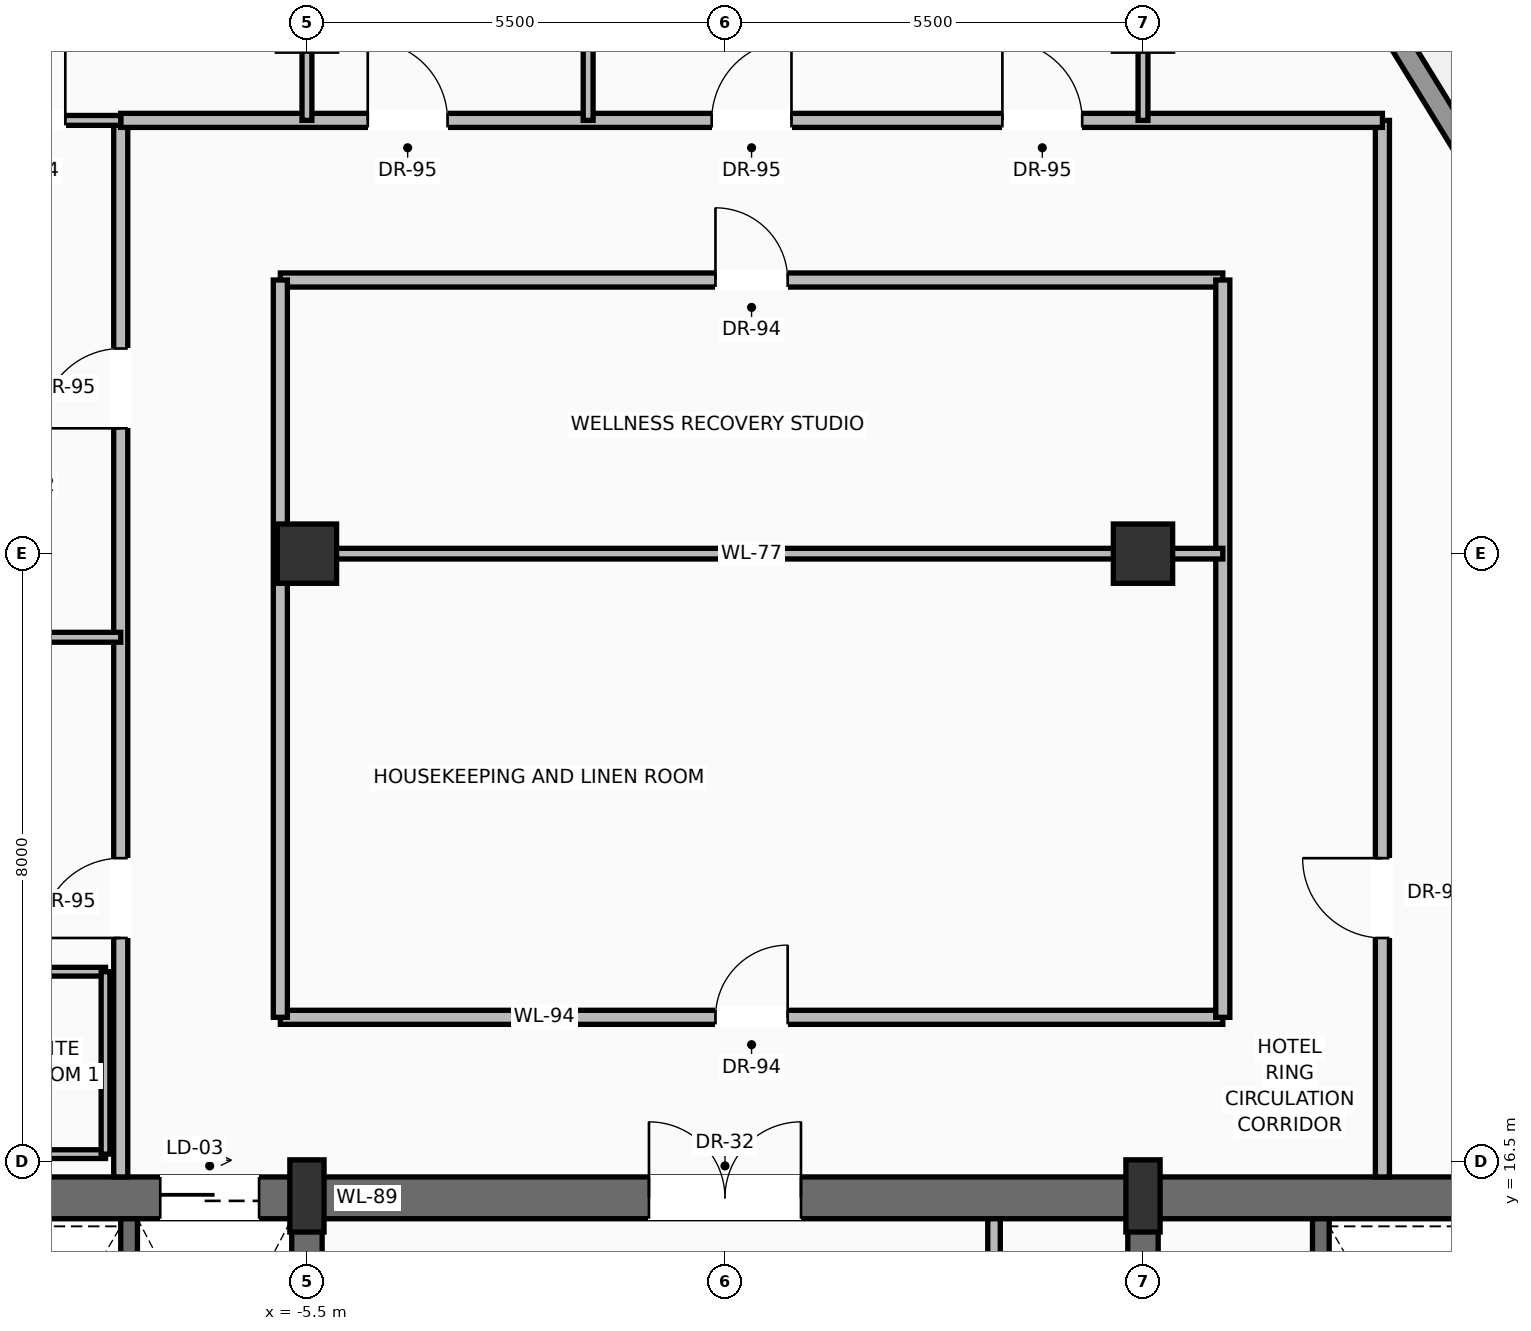
"""IFC4 building model, lengths in metres.
Left out: names, types, materials, properties, quantities, classifications, styles, units other than length and angle.
Written with IfcOpenShell. Run it as: python <this file> out.ifc"""

import sys

from ifc_helpers import new_model, si_unit, direction, frame, frame_2d, origin, origin_2d, place, context, subcontext, project, spatial, rectangle, extrude, source, transform, mapped, element, fill, save


model = new_model("IFC4")
c1 = context("Model", 3, precision=1e-05, world=origin(), true_north=direction((0.0, 1.0)))
c2 = subcontext(c1, "Body", "Model", "MODEL_VIEW")
j1 = project(units=[si_unit("LENGTHUNIT", "METRE"), si_unit("PLANEANGLEUNIT", "RADIAN")], contexts=[c1])
p1 = place(None, origin())
s1 = spatial("IfcSite", under=j1, at=p1, CompositionType="ELEMENT")
p2 = place(p1, origin())
s2 = spatial("IfcBuilding", under=s1, at=p2, CompositionType="ELEMENT")
p3 = place(p2, frame((0.0, 0.0, 244.15)))
s3 = spatial("IfcBuildingStorey", under=s2, at=p3, CompositionType="ELEMENT", Elevation=244.15)
p4 = place(p3, frame((-10.7, 16.025, 0.0), z_axis=(0.0, 0.0, 1.0), x_axis=(1.0, 0.0, 0.0)))
e1 = element("IfcWall", 1, at=p4, inside=s3, PredefinedType="SHEAR", context=c2, shape_type="SweptSolid", body=[
    extrude(rectangle(XDim=21.4, YDim=0.55, at=frame_2d((10.7, 0.0))), origin(), (0.0, 0.0, 1.0), 3.24),
])
p5 = place(p4, frame((3.27, 0.0, 0.0)))
e2 = element("IfcOpeningElement", 2, at=p5, cuts=e1, PredefinedType="OPENING", context=c2, shape_type="SweptSolid", body=[
    extrude(rectangle(XDim=1.3, YDim=2.3, at=frame_2d((0.65, 1.15))), frame((0.0, 0.285, 0.0), z_axis=(0.0, -1.0, 0.0), x_axis=(1.0, 0.0, 0.0)), (0.0, 0.0, 1.0), 0.57),
])
p6 = place(p4, frame((9.7, 0.0, 0.0)))
e3 = element("IfcOpeningElement", 3, at=p6, cuts=e1, PredefinedType="OPENING", context=c2, shape_type="SweptSolid", body=[
    extrude(rectangle(XDim=2.0, YDim=2.4, at=frame_2d((1.0, 1.2))), frame((0.0, 0.285, 0.0), z_axis=(0.0, -1.0, 0.0), x_axis=(1.0, 0.0, 0.0)), (0.0, 0.0, 1.0), 0.57),
])
p7 = place(p3, frame((-5.5, 0.575, 0.0), z_axis=(0.0, 0.0, 1.0), x_axis=(0.0, 1.0, 0.0)))
e4 = element("IfcWall", 4, at=p7, inside=s3, PredefinedType="SHEAR", context=c2, shape_type="SweptSolid", body=[
    extrude(rectangle(XDim=15.45, YDim=0.4, at=frame_2d((7.725, 0.0))), origin(), (0.0, 0.0, 1.0), 3.24),
])
p8 = place(p7, frame((8.925, 0.0, 0.0)))
e5 = element("IfcOpeningElement", 5, at=p8, cuts=e4, PredefinedType="OPENING", context=c2, shape_type="SweptSolid", body=[
    extrude(rectangle(XDim=1.1, YDim=2.2, at=frame_2d((0.55, 1.1))), frame((0.0, 0.21, 0.0), z_axis=(0.0, -1.0, 0.0), x_axis=(1.0, 0.0, 0.0)), (0.0, 0.0, 1.0), 0.42),
])
p9 = place(p3, frame((5.5, 0.575, 0.0), z_axis=(0.0, 0.0, 1.0), x_axis=(0.0, 1.0, 0.0)))
e6 = element("IfcWall", 6, at=p9, inside=s3, PredefinedType="SHEAR", context=c2, shape_type="SweptSolid", body=[
    extrude(rectangle(XDim=15.45, YDim=0.4, at=frame_2d((7.725, 0.0))), origin(), (0.0, 0.0, 1.0), 3.24),
])
p10 = place(p9, frame((8.925, 0.0, 0.0)))
e7 = element("IfcOpeningElement", 7, at=p10, cuts=e6, PredefinedType="OPENING", context=c2, shape_type="SweptSolid", body=[
    extrude(rectangle(XDim=1.1, YDim=2.2, at=frame_2d((0.55, 1.1))), frame((0.0, 0.21, 0.0), z_axis=(0.0, -1.0, 0.0), x_axis=(1.0, 0.0, 0.0)), (0.0, 0.0, 1.0), 0.42),
])
m1 = source(origin(), c2, "Body", "SweptSolid", [
    extrude(rectangle(XDim=0.45, YDim=0.95, at=origin_2d()), origin(), (0.0, 0.0, 1.0), 3.45),
])
for number, where, z_axis, x_axis in (
    (8, (-5.5, 16.05, 0.0), (0.0, 0.0, 1.0), (1.0, 0.0, 0.0)),
    (9, (5.5, 16.05, 0.0), (0.0, 0.0, 1.0), (1.0, 0.0, 0.0)),
):
    element("IfcColumn", number, at=place(p3, frame(where, z_axis=z_axis, x_axis=x_axis)), inside=s3, PredefinedType="PILASTER", context=c2, shape_type="MappedRepresentation", body=[
        mapped(m1, transform((0.0, 0.0, 0.0), scale=1.0)),
    ])
m2 = source(origin(), c2, "Body", "SweptSolid", [
    extrude(rectangle(XDim=0.78, YDim=0.78, at=origin_2d()), origin(), (0.0, 0.0, 1.0), 3.45),
])
for number, where, z_axis, x_axis in (
    (10, (-5.5, 24.5, 0.0), (0.0, 0.0, 1.0), (1.0, 0.0, 0.0)),
    (11, (5.5, 24.5, 0.0), (0.0, 0.0, 1.0), (1.0, 0.0, 0.0)),
):
    element("IfcColumn", number, at=place(p3, frame(where, z_axis=z_axis, x_axis=x_axis)), inside=s3, PredefinedType="COLUMN", context=c2, shape_type="MappedRepresentation", body=[
        mapped(m2, transform((0.0, 0.0, 0.0), scale=1.0)),
    ])
p11 = place(p3, frame((8.394, 32.017, 0.0), z_axis=(0.0, 0.0, 1.0), x_axis=(0.523559364354, -0.851989197113, 0.0)))
e12 = element("IfcWall", 12, at=p11, inside=s3, PredefinedType="SOLIDWALL", context=c2, shape_type="SweptSolid", body=[
    extrude(rectangle(XDim=19.7, YDim=0.28, at=frame_2d((9.85, 0.0))), origin(), (0.0, 0.0, 1.0), 2.82),
])
p12 = place(p11, frame((4.728, 0.0, 0.0)))
e13 = element("IfcOpeningElement", 13, at=p12, cuts=e12, PredefinedType="OPENING", context=c2, shape_type="SweptSolid", body=[
    extrude(rectangle(XDim=1.6, YDim=2.35, at=frame_2d((0.8, 1.175))), frame((0.0, 0.15, 0.0), z_axis=(0.0, -1.0, 0.0), x_axis=(1.0, 0.0, 0.0)), (0.0, 0.0, 1.0), 0.3),
])
p13 = place(p11, frame((13.396, 0.0, 0.9)))
e14 = element("IfcOpeningElement", 14, at=p13, cuts=e12, PredefinedType="OPENING", context=c2, shape_type="SweptSolid", body=[
    extrude(rectangle(XDim=1.55, YDim=1.75, at=frame_2d((0.775, 0.875))), frame((0.0, 0.15, 0.0), z_axis=(0.0, -1.0, 0.0), x_axis=(1.0, 0.0, 0.0)), (0.0, 0.0, 1.0), 0.3),
])
for number, where, z_axis, x_axis in (
    (15, (-7.84, 11.87, 0.0), (0.0, 0.0, 1.0), (0.0, 1.0, 0.0)),
    (16, (7.84, 11.87, 0.0), (0.0, 0.0, 1.0), (0.0, 1.0, 0.0)),
):
    element("IfcWall", number, at=place(p3, frame(where, z_axis=z_axis, x_axis=x_axis)), inside=s3, PredefinedType="SOLIDWALL", context=c2, shape_type="SweptSolid", body=[
        extrude(rectangle(XDim=3.88, YDim=0.22, at=frame_2d((1.94, 0.0))), origin(), (0.0, 0.0, 1.0), 3.24),
    ])
p14 = place(p3, frame((3.54, 11.22, 0.0), z_axis=(0.0, 0.0, 1.0), x_axis=(0.0, 1.0, 0.0)))
e17 = element("IfcWall", 17, at=p14, inside=s3, PredefinedType="PARTITIONING", context=c2, shape_type="SweptSolid", body=[
    extrude(rectangle(XDim=4.53, YDim=0.165, at=frame_2d((2.265, 0.0))), origin(), (0.0, 0.0, 1.0), 3.232),
])
p15 = place(p14, frame((1.25, 0.0, 0.0)))
e18 = element("IfcOpeningElement", 18, at=p15, cuts=e17, PredefinedType="OPENING", context=c2, shape_type="SweptSolid", body=[
    extrude(rectangle(XDim=0.9, YDim=2.1, at=frame_2d((0.45, 1.05))), frame((0.0, 0.093, 0.0), z_axis=(0.0, -1.0, 0.0), x_axis=(1.0, 0.0, 0.0)), (0.0, 0.0, 1.0), 0.185),
])
p16 = place(p3, frame((-5.85, 18.4, 0.0), z_axis=(0.0, 0.0, 1.0), x_axis=(1.0, 0.0, 0.0)))
e19 = element("IfcWall", 19, at=p16, inside=s3, PredefinedType="PARTITIONING", context=c2, shape_type="SweptSolid", body=[
    extrude(rectangle(XDim=12.4, YDim=0.185, at=frame_2d((6.2, 0.0))), origin(), (0.0, 0.0, 1.0), 3.232),
])
p17 = place(p16, frame((5.725, 0.0, 0.0)))
e20 = element("IfcOpeningElement", 20, at=p17, cuts=e19, PredefinedType="OPENING", context=c2, shape_type="SweptSolid", body=[
    extrude(rectangle(XDim=0.95, YDim=2.2, at=frame_2d((0.475, 1.1))), frame((0.0, 0.103, 0.0), z_axis=(0.0, -1.0, 0.0), x_axis=(1.0, 0.0, 0.0)), (0.0, 0.0, 1.0), 0.205),
])
p18 = place(p3, frame((-5.85, 28.1, 0.0), z_axis=(0.0, 0.0, 1.0), x_axis=(1.0, 0.0, 0.0)))
e21 = element("IfcWall", 21, at=p18, inside=s3, PredefinedType="PARTITIONING", context=c2, shape_type="SweptSolid", body=[
    extrude(rectangle(XDim=12.4, YDim=0.185, at=frame_2d((6.2, 0.0))), origin(), (0.0, 0.0, 1.0), 2.885),
])
p19 = place(p18, frame((5.725, 0.0, 0.0)))
e22 = element("IfcOpeningElement", 22, at=p19, cuts=e21, PredefinedType="OPENING", context=c2, shape_type="SweptSolid", body=[
    extrude(rectangle(XDim=0.95, YDim=2.2, at=frame_2d((0.475, 1.1))), frame((0.0, 0.103, 0.0), z_axis=(0.0, -1.0, 0.0), x_axis=(1.0, 0.0, 0.0)), (0.0, 0.0, 1.0), 0.205),
])
for number, where, z_axis, x_axis in (
    (23, (-5.85, 18.4, 0.0), (0.0, 0.0, 1.0), (0.0, 1.0, 0.0)),
    (24, (6.55, 18.4, 0.0), (0.0, 0.0, 1.0), (0.0, 1.0, 0.0)),
):
    element("IfcWall", number, at=place(p3, frame(where, z_axis=z_axis, x_axis=x_axis)), inside=s3, PredefinedType="PARTITIONING", context=c2, shape_type="SweptSolid", body=[
        extrude(rectangle(XDim=9.7, YDim=0.185, at=frame_2d((4.85, 0.0))), origin(), (0.0, 0.0, 1.0), 3.232),
    ])
p20 = place(p3, frame((-7.95, 16.3, 0.0), z_axis=(0.0, 0.0, 1.0), x_axis=(0.0, 1.0, 0.0)))
e25 = element("IfcWall", 25, at=p20, inside=s3, PredefinedType="PARTITIONING", context=c2, shape_type="SweptSolid", body=[
    extrude(rectangle(XDim=13.9, YDim=0.185, at=frame_2d((6.95, 0.0))), origin(), (0.0, 0.0, 1.0), 3.232),
])
p21 = place(p20, frame((3.144, 0.0, 0.0)))
e26 = element("IfcOpeningElement", 26, at=p21, cuts=e25, PredefinedType="OPENING", context=c2, shape_type="SweptSolid", body=[
    extrude(rectangle(XDim=1.05, YDim=2.25, at=frame_2d((0.525, 1.125))), frame((0.0, 0.103, 0.0), z_axis=(0.0, -1.0, 0.0), x_axis=(1.0, 0.0, 0.0)), (0.0, 0.0, 1.0), 0.205),
])
p22 = place(p20, frame((9.849, 0.0, 0.0)))
e27 = element("IfcOpeningElement", 27, at=p22, cuts=e25, PredefinedType="OPENING", context=c2, shape_type="SweptSolid", body=[
    extrude(rectangle(XDim=1.05, YDim=2.25, at=frame_2d((0.525, 1.125))), frame((0.0, 0.103, 0.0), z_axis=(0.0, -1.0, 0.0), x_axis=(1.0, 0.0, 0.0)), (0.0, 0.0, 1.0), 0.205),
])
p23 = place(p3, frame((8.65, 16.3, 0.0), z_axis=(0.0, 0.0, 1.0), x_axis=(0.0, 1.0, 0.0)))
e28 = element("IfcWall", 28, at=p23, inside=s3, PredefinedType="PARTITIONING", context=c2, shape_type="SweptSolid", body=[
    extrude(rectangle(XDim=13.9, YDim=0.185, at=frame_2d((6.95, 0.0))), origin(), (0.0, 0.0, 1.0), 3.232),
])
p24 = place(p23, frame((3.144, 0.0, 0.0)))
e29 = element("IfcOpeningElement", 29, at=p24, cuts=e28, PredefinedType="OPENING", context=c2, shape_type="SweptSolid", body=[
    extrude(rectangle(XDim=1.05, YDim=2.25, at=frame_2d((0.525, 1.125))), frame((0.0, 0.103, 0.0), z_axis=(0.0, -1.0, 0.0), x_axis=(1.0, 0.0, 0.0)), (0.0, 0.0, 1.0), 0.205),
])
p25 = place(p3, frame((-7.95, 30.2, 0.0), z_axis=(0.0, 0.0, 1.0), x_axis=(1.0, 0.0, 0.0)))
e30 = element("IfcWall", 30, at=p25, inside=s3, PredefinedType="PARTITIONING", context=c2, shape_type="SweptSolid", body=[
    extrude(rectangle(XDim=16.6, YDim=0.185, at=frame_2d((8.3, 0.0))), origin(), (0.0, 0.0, 1.0), 3.232),
])
p26 = place(p25, frame((3.25, 0.0, 0.0)))
e31 = element("IfcOpeningElement", 31, at=p26, cuts=e30, PredefinedType="OPENING", context=c2, shape_type="SweptSolid", body=[
    extrude(rectangle(XDim=1.05, YDim=2.25, at=frame_2d((0.525, 1.125))), frame((0.0, 0.103, 0.0), z_axis=(0.0, -1.0, 0.0), x_axis=(1.0, 0.0, 0.0)), (0.0, 0.0, 1.0), 0.205),
])
p27 = place(p25, frame((7.775, 0.0, 0.0)))
e32 = element("IfcOpeningElement", 32, at=p27, cuts=e30, PredefinedType="OPENING", context=c2, shape_type="SweptSolid", body=[
    extrude(rectangle(XDim=1.05, YDim=2.25, at=frame_2d((0.525, 1.125))), frame((0.0, 0.103, 0.0), z_axis=(0.0, -1.0, 0.0), x_axis=(1.0, 0.0, 0.0)), (0.0, 0.0, 1.0), 0.205),
])
p28 = place(p25, frame((11.6, 0.0, 0.0)))
e33 = element("IfcOpeningElement", 33, at=p28, cuts=e30, PredefinedType="OPENING", context=c2, shape_type="SweptSolid", body=[
    extrude(rectangle(XDim=1.05, YDim=2.25, at=frame_2d((0.525, 1.125))), frame((0.0, 0.103, 0.0), z_axis=(0.0, -1.0, 0.0), x_axis=(1.0, 0.0, 0.0)), (0.0, 0.0, 1.0), 0.205),
])
p29 = place(p3, frame((-5.85, 24.5, 0.0), z_axis=(0.0, 0.0, 1.0), x_axis=(1.0, 0.0, 0.0)))
e34 = element("IfcWall", 34, at=p29, inside=s3, PredefinedType="PARTITIONING", context=c2, shape_type="SweptSolid", body=[
    extrude(rectangle(XDim=12.4, YDim=0.14, at=frame_2d((6.2, 0.0))), origin(), (0.0, 0.0, 1.0), 2.683),
])
p30 = place(p3, frame((-10.469, 30.2, 0.0), z_axis=(0.0, 0.0, 1.0), x_axis=(1.0, 0.0, 0.0)))
e35 = element("IfcWall", 35, at=p30, inside=s3, PredefinedType="PARTITIONING", context=c2, shape_type="SweptSolid", body=[
    extrude(rectangle(XDim=2.519, YDim=0.13, at=frame_2d((1.26, 0.0))), origin(), (0.0, 0.0, 1.0), 3.232),
])
p31 = place(p30, frame((0.84, 0.0, 0.0)))
e36 = element("IfcOpeningElement", 36, at=p31, cuts=e35, PredefinedType="OPENING", context=c2, shape_type="SweptSolid", body=[
    extrude(rectangle(XDim=0.95, YDim=2.2, at=frame_2d((0.475, 1.1))), frame((0.0, 0.075, 0.0), z_axis=(0.0, -1.0, 0.0), x_axis=(1.0, 0.0, 0.0)), (0.0, 0.0, 1.0), 0.15),
])
p32 = place(p3, frame((-5.5, 30.2, 0.0), z_axis=(0.0, 0.0, 1.0), x_axis=(0.0, 1.0, 0.0)))
e37 = element("IfcWall", 37, at=p32, inside=s3, PredefinedType="PARTITIONING", context=c2, shape_type="SweptSolid", body=[
    extrude(rectangle(XDim=8.453, YDim=0.13, at=frame_2d((4.227, 0.0))), origin(), (0.0, 0.0, 1.0), 2.683),
])
p33 = place(p3, frame((5.5, 30.2, 0.0), z_axis=(0.0, 0.0, 1.0), x_axis=(0.0, 1.0, 0.0)))
e38 = element("IfcWall", 38, at=p33, inside=s3, PredefinedType="PARTITIONING", context=c2, shape_type="SweptSolid", body=[
    extrude(rectangle(XDim=6.776, YDim=0.13, at=frame_2d((3.388, 0.0))), origin(), (0.0, 0.0, 1.0), 2.683),
])
p34 = place(p3, frame((-1.8, 30.2, 0.0), z_axis=(0.0, 0.0, 1.0), x_axis=(0.0, 1.0, 0.0)))
e39 = element("IfcWall", 39, at=p34, inside=s3, PredefinedType="PARTITIONING", context=c2, shape_type="SweptSolid", body=[
    extrude(rectangle(XDim=12.561, YDim=0.13, at=frame_2d((6.281, 0.0))), origin(), (0.0, 0.0, 1.0), 3.232),
])
for number, where, z_axis, x_axis in (
    (40, (-10.8, 16.6, 0.0), (0.0, 0.0, 1.0), (1.0, 0.0, 0.0)),
    (41, (-10.8, 19.0, 0.0), (0.0, 0.0, 1.0), (1.0, 0.0, 0.0)),
):
    element("IfcWall", number, at=place(p3, frame(where, z_axis=z_axis, x_axis=x_axis)), inside=s3, PredefinedType="PARTITIONING", context=c2, shape_type="SweptSolid", body=[
        extrude(rectangle(XDim=2.65, YDim=0.115, at=frame_2d((1.325, 0.0))), origin(), (0.0, 0.0, 1.0), 3.232),
    ])
p35 = place(p3, frame((-8.15, 16.6, 0.0), z_axis=(0.0, 0.0, 1.0), x_axis=(0.0, 1.0, 0.0)))
e42 = element("IfcWall", 42, at=p35, inside=s3, PredefinedType="PARTITIONING", context=c2, shape_type="SweptSolid", body=[
    extrude(rectangle(XDim=2.4, YDim=0.115, at=frame_2d((1.2, 0.0))), origin(), (0.0, 0.0, 1.0), 3.232),
])
p36 = place(p3, frame((-14.466, 23.4, 0.0), z_axis=(0.0, 0.0, 1.0), x_axis=(1.0, 0.0, 0.0)))
e43 = element("IfcWall", 43, at=p36, inside=s3, PredefinedType="PARTITIONING", context=c2, shape_type="SweptSolid", body=[
    extrude(rectangle(XDim=6.516, YDim=0.13, at=frame_2d((3.258, 0.0))), origin(), (0.0, 0.0, 1.0), 3.232),
])
m3 = source(origin(), c2, "Body", "SweptSolid", [
    extrude(rectangle(XDim=1.3, YDim=2.3, at=frame_2d((0.65, 1.15))), frame((0.0, 0.025, 0.0), z_axis=(0.0, -1.0, 0.0), x_axis=(1.0, 0.0, 0.0)), (0.0, 0.0, 1.0), 0.05),
])
p37 = place(p5, origin())
e44 = element("IfcDoor", 44, at=p37, inside=s3, OperationType="SLIDING_TO_RIGHT", PredefinedType="DOOR", context=c2, shape_type="MappedRepresentation", body=[
    mapped(m3, transform((0.0, 0.0, 0.0), scale=1.0)),
])
fill(e2, e44)
m4 = source(origin(), c2, "Body", "SweptSolid", [
    extrude(rectangle(XDim=2.0, YDim=2.4, at=frame_2d((1.0, 1.2))), frame((0.0, 0.025, 0.0), z_axis=(0.0, -1.0, 0.0), x_axis=(1.0, 0.0, 0.0)), (0.0, 0.0, 1.0), 0.05),
])
p38 = place(p6, origin())
e45 = element("IfcDoor", 45, at=p38, inside=s3, OperationType="DOUBLE_DOOR_SINGLE_SWING", PredefinedType="DOOR", context=c2, shape_type="MappedRepresentation", body=[
    mapped(m4, transform((0.0, 0.0, 0.0), scale=1.0)),
])
fill(e3, e45)
m5 = source(origin(), c2, "Body", "SweptSolid", [
    extrude(rectangle(XDim=0.95, YDim=2.2, at=frame_2d((0.475, 1.1))), frame((0.0, 0.025, 0.0), z_axis=(0.0, -1.0, 0.0), x_axis=(1.0, 0.0, 0.0)), (0.0, 0.0, 1.0), 0.05),
])
p39 = place(p17, origin())
e46 = element("IfcDoor", 46, at=p39, inside=s3, OperationType="SINGLE_SWING_RIGHT", PredefinedType="DOOR", context=c2, shape_type="MappedRepresentation", body=[
    mapped(m5, transform((0.0, 0.0, 0.0), scale=1.0)),
])
fill(e20, e46)
p40 = place(p19, origin())
e47 = element("IfcDoor", 47, at=p40, inside=s3, OperationType="SINGLE_SWING_LEFT", PredefinedType="DOOR", context=c2, shape_type="MappedRepresentation", body=[
    mapped(m5, transform((0.0, 0.0, 0.0), scale=1.0)),
])
fill(e22, e47)
m6 = source(origin(), c2, "Body", "SweptSolid", [
    extrude(rectangle(XDim=1.05, YDim=2.25, at=frame_2d((0.525, 1.125))), frame((0.0, 0.025, 0.0), z_axis=(0.0, -1.0, 0.0), x_axis=(1.0, 0.0, 0.0)), (0.0, 0.0, 1.0), 0.05),
])
p41 = place(p21, origin())
e48 = element("IfcDoor", 48, at=p41, inside=s3, OperationType="SINGLE_SWING_LEFT", PredefinedType="DOOR", context=c2, shape_type="MappedRepresentation", body=[
    mapped(m6, transform((0.0, 0.0, 0.0), scale=1.0)),
])
fill(e26, e48)
p42 = place(p22, origin())
e49 = element("IfcDoor", 49, at=p42, inside=s3, OperationType="SINGLE_SWING_LEFT", PredefinedType="DOOR", context=c2, shape_type="MappedRepresentation", body=[
    mapped(m6, transform((0.0, 0.0, 0.0), scale=1.0)),
])
fill(e27, e49)
p43 = place(p24, origin())
e50 = element("IfcDoor", 50, at=p43, inside=s3, OperationType="SINGLE_SWING_RIGHT", PredefinedType="DOOR", context=c2, shape_type="MappedRepresentation", body=[
    mapped(m6, transform((0.0, 0.0, 0.0), scale=1.0)),
])
fill(e29, e50)
p44 = place(p26, origin())
e51 = element("IfcDoor", 51, at=p44, inside=s3, OperationType="SINGLE_SWING_LEFT", PredefinedType="DOOR", context=c2, shape_type="MappedRepresentation", body=[
    mapped(m6, transform((0.0, 0.0, 0.0), scale=1.0)),
])
fill(e31, e51)
p45 = place(p27, origin())
e52 = element("IfcDoor", 52, at=p45, inside=s3, OperationType="SINGLE_SWING_RIGHT", PredefinedType="DOOR", context=c2, shape_type="MappedRepresentation", body=[
    mapped(m6, transform((0.0, 0.0, 0.0), scale=1.0)),
])
fill(e32, e52)
p46 = place(p28, origin())
e53 = element("IfcDoor", 53, at=p46, inside=s3, OperationType="SINGLE_SWING_LEFT", PredefinedType="DOOR", context=c2, shape_type="MappedRepresentation", body=[
    mapped(m6, transform((0.0, 0.0, 0.0), scale=1.0)),
])
fill(e33, e53)
p47 = place(p31, origin())
e54 = element("IfcDoor", 54, at=p47, inside=s3, OperationType="SINGLE_SWING_RIGHT", PredefinedType="DOOR", context=c2, shape_type="MappedRepresentation", body=[
    mapped(m5, transform((0.0, 0.0, 0.0), scale=1.0)),
])
fill(e36, e54)
save(model, sys.argv[1])
